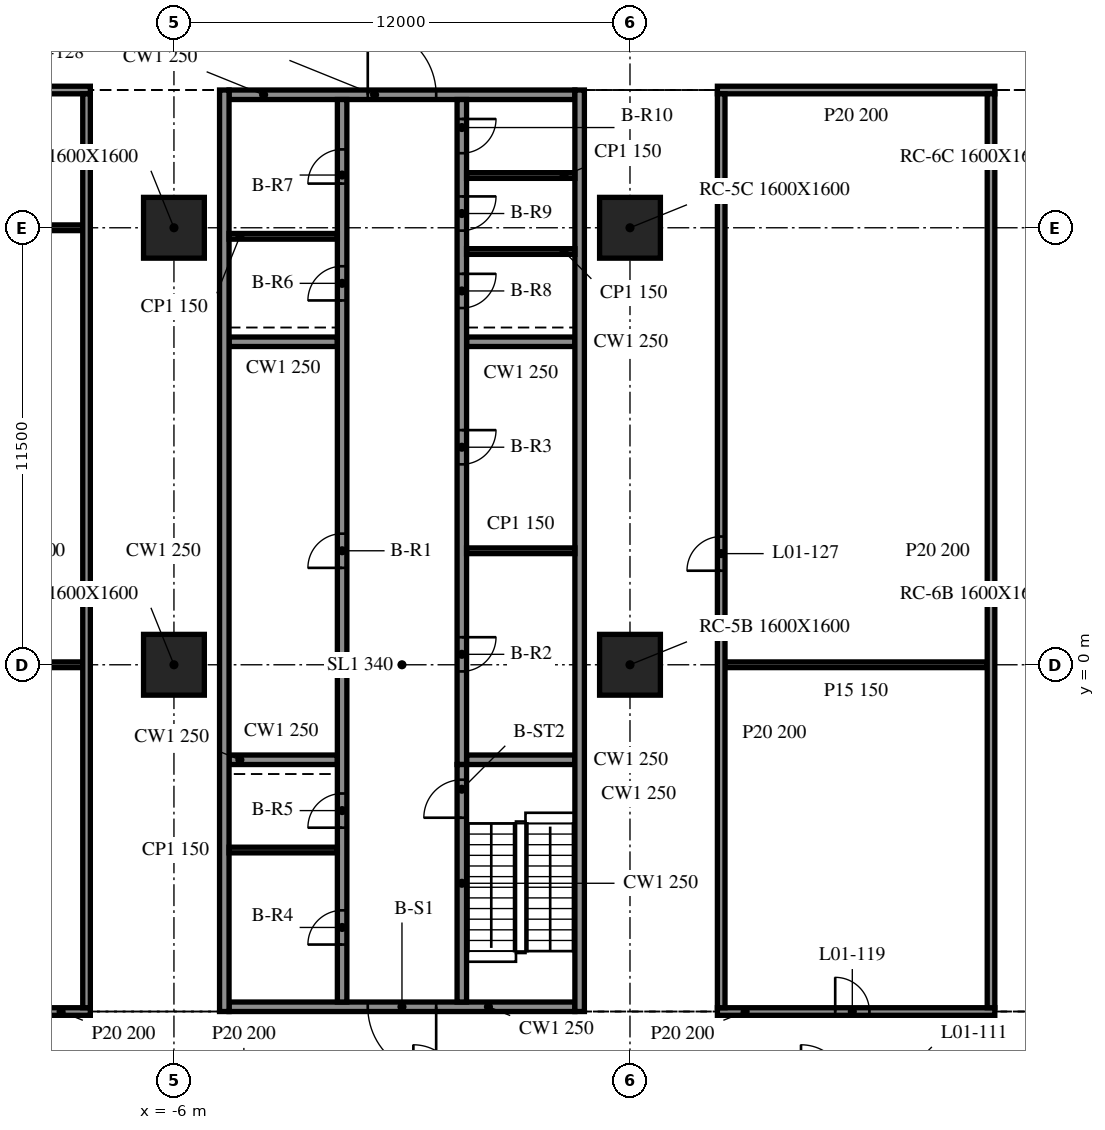
"""IFC4 building model, lengths in metres.
Left out: names, types, materials, properties, quantities, classifications, styles, units other than length and angle.
Written with IfcOpenShell. Run it as: python <this file> out.ifc"""

import sys

from ifc_helpers import new_model, si_unit, direction, frame, frame_2d, origin, origin_2d, place, context, subcontext, project, spatial, rectangle, extrude, element, fill, save


model = new_model("IFC4")
c1 = context("Model", 3, precision=1e-05, world=origin(), true_north=direction((0.0, 1.0)))
c2 = subcontext(c1, "Body", "Model", "MODEL_VIEW")
j1 = project(units=[si_unit("LENGTHUNIT", "METRE"), si_unit("PLANEANGLEUNIT", "RADIAN")], contexts=[c1])
p1 = place(None, origin())
s1 = spatial("IfcSite", under=j1, at=p1, CompositionType="ELEMENT")
p2 = place(p1, origin())
s2 = spatial("IfcBuilding", under=s1, at=p2, CompositionType="ELEMENT")
p3 = place(p2, frame((0.0, 0.0, 7.2)))
s3 = spatial("IfcBuildingStorey", under=s2, at=p3, CompositionType="ELEMENT", Elevation=7.2)
for number, where, z_axis, x_axis in (
    (1, (-6.0, 0.0, -0.34), (0.0, 0.0, 1.0), (1.0, 0.0, 0.0)),
    (2, (-6.0, 11.5, -0.34), (0.0, 0.0, 1.0), (1.0, 0.0, 0.0)),
    (3, (6.0, 0.0, -0.34), (0.0, 0.0, 1.0), (1.0, 0.0, 0.0)),
    (4, (6.0, 11.5, -0.34), (0.0, 0.0, 1.0), (1.0, 0.0, 0.0)),
):
    element("IfcColumn", number, at=place(p3, frame(where, z_axis=z_axis, x_axis=x_axis)), inside=s3, PredefinedType="COLUMN", context=c2, shape_type="SweptSolid", body=[
        extrude(rectangle(XDim=1.6, YDim=1.6, at=origin_2d()), origin(), (0.0, 0.0, 1.0), 4.3),
    ])
for number, where, z_axis, x_axis in (
    (5, (-4.675, 15.125, 0.0), (0.0, 0.0, 1.0), (0.0, -1.0, 0.0)),
    (6, (4.675, -9.125, 0.0), (0.0, 0.0, 1.0), (0.0, 1.0, 0.0)),
):
    element("IfcWall", number, at=place(p3, frame(where, z_axis=z_axis, x_axis=x_axis)), inside=s3, PredefinedType="SOLIDWALL", context=c2, shape_type="SweptSolid", body=[
        extrude(rectangle(XDim=24.25, YDim=0.25, at=frame_2d((12.125, 0.0))), origin(), (0.0, 0.0, 1.0), 3.96),
    ])
p4 = place(p3, frame((4.55, -9.0, 0.0), z_axis=(0.0, 0.0, 1.0), x_axis=(-1.0, 0.0, 0.0)))
e7 = element("IfcWall", 7, at=p4, inside=s3, PredefinedType="SOLIDWALL", context=c2, shape_type="SweptSolid", body=[
    extrude(rectangle(XDim=9.1, YDim=0.25, at=frame_2d((4.55, 0.0))), origin(), (0.0, 0.0, 1.0), 3.96),
])
p5 = place(p4, frame((3.65, 0.0, 0.0)))
e8 = element("IfcOpeningElement", 8, at=p5, cuts=e7, PredefinedType="OPENING", context=c2, shape_type="SweptSolid", body=[
    extrude(rectangle(XDim=1.8, YDim=2.1, at=frame_2d((0.9, 1.05))), frame((0.0, 0.135, 0.0), z_axis=(0.0, -1.0, 0.0), x_axis=(1.0, 0.0, 0.0)), (0.0, 0.0, 1.0), 0.27),
])
p6 = place(p3, frame((-4.55, 15.0, 0.0), z_axis=(0.0, 0.0, 1.0), x_axis=(1.0, 0.0, 0.0)))
e9 = element("IfcWall", 9, at=p6, inside=s3, PredefinedType="SOLIDWALL", context=c2, shape_type="SweptSolid", body=[
    extrude(rectangle(XDim=9.1, YDim=0.25, at=frame_2d((4.55, 0.0))), origin(), (0.0, 0.0, 1.0), 3.96),
])
p7 = place(p6, frame((3.65, 0.0, 0.0)))
e10 = element("IfcOpeningElement", 10, at=p7, cuts=e9, PredefinedType="OPENING", context=c2, shape_type="SweptSolid", body=[
    extrude(rectangle(XDim=1.8, YDim=2.1, at=frame_2d((0.9, 1.05))), frame((0.0, 0.135, 0.0), z_axis=(0.0, -1.0, 0.0), x_axis=(1.0, 0.0, 0.0)), (0.0, 0.0, 1.0), 0.27),
])
p8 = place(p3, frame((-1.575, -8.875, 0.0), z_axis=(0.0, 0.0, 1.0), x_axis=(0.0, 1.0, 0.0)))
e11 = element("IfcWall", 11, at=p8, inside=s3, PredefinedType="SOLIDWALL", context=c2, shape_type="SweptSolid", body=[
    extrude(rectangle(XDim=23.75, YDim=0.25, at=frame_2d((11.875, 0.0))), origin(), (0.0, 0.0, 1.0), 3.96),
])
p9 = place(p8, frame((11.425, 0.0, 0.0)))
e12 = element("IfcOpeningElement", 12, at=p9, cuts=e11, PredefinedType="OPENING", context=c2, shape_type="SweptSolid", body=[
    extrude(rectangle(XDim=0.9, YDim=2.1, at=frame_2d((0.45, 1.05))), frame((0.0, 0.135, 0.0), z_axis=(0.0, -1.0, 0.0), x_axis=(1.0, 0.0, 0.0)), (0.0, 0.0, 1.0), 0.27),
])
p10 = place(p8, frame((1.512, 0.0, 0.0)))
e13 = element("IfcOpeningElement", 13, at=p10, cuts=e11, PredefinedType="OPENING", context=c2, shape_type="SweptSolid", body=[
    extrude(rectangle(XDim=0.9, YDim=2.1, at=frame_2d((0.45, 1.05))), frame((0.0, 0.135, 0.0), z_axis=(0.0, -1.0, 0.0), x_axis=(1.0, 0.0, 0.0)), (0.0, 0.0, 1.0), 0.27),
])
p11 = place(p8, frame((4.587, 0.0, 0.0)))
e14 = element("IfcOpeningElement", 14, at=p11, cuts=e11, PredefinedType="OPENING", context=c2, shape_type="SweptSolid", body=[
    extrude(rectangle(XDim=0.9, YDim=2.1, at=frame_2d((0.45, 1.05))), frame((0.0, 0.135, 0.0), z_axis=(0.0, -1.0, 0.0), x_axis=(1.0, 0.0, 0.0)), (0.0, 0.0, 1.0), 0.27),
])
p12 = place(p8, frame((18.462, 0.0, 0.0)))
e15 = element("IfcOpeningElement", 15, at=p12, cuts=e11, PredefinedType="OPENING", context=c2, shape_type="SweptSolid", body=[
    extrude(rectangle(XDim=0.9, YDim=2.1, at=frame_2d((0.45, 1.05))), frame((0.0, 0.135, 0.0), z_axis=(0.0, -1.0, 0.0), x_axis=(1.0, 0.0, 0.0)), (0.0, 0.0, 1.0), 0.27),
])
p13 = place(p8, frame((21.538, 0.0, 0.0)))
e16 = element("IfcOpeningElement", 16, at=p13, cuts=e11, PredefinedType="OPENING", context=c2, shape_type="SweptSolid", body=[
    extrude(rectangle(XDim=0.9, YDim=2.1, at=frame_2d((0.45, 1.05))), frame((0.0, 0.135, 0.0), z_axis=(0.0, -1.0, 0.0), x_axis=(1.0, 0.0, 0.0)), (0.0, 0.0, 1.0), 0.27),
])
p14 = place(p3, frame((1.575, -8.875, 0.0), z_axis=(0.0, 0.0, 1.0), x_axis=(0.0, 1.0, 0.0)))
e17 = element("IfcWall", 17, at=p14, inside=s3, PredefinedType="SOLIDWALL", context=c2, shape_type="SweptSolid", body=[
    extrude(rectangle(XDim=6.25, YDim=0.25, at=frame_2d((3.125, 0.0))), origin(), (0.0, 0.0, 1.0), 3.96),
])
p15 = place(p14, frame((4.85, 0.0, 0.0)))
e18 = element("IfcOpeningElement", 18, at=p15, cuts=e17, PredefinedType="OPENING", context=c2, shape_type="SweptSolid", body=[
    extrude(rectangle(XDim=1.0, YDim=2.1, at=frame_2d((0.5, 1.05))), frame((0.0, 0.135, 0.0), z_axis=(0.0, -1.0, 0.0), x_axis=(1.0, 0.0, 0.0)), (0.0, 0.0, 1.0), 0.27),
])
p16 = place(p3, frame((1.575, 14.875, 0.0), z_axis=(0.0, 0.0, 1.0), x_axis=(0.0, -1.0, 0.0)))
e19 = element("IfcWall", 19, at=p16, inside=s3, PredefinedType="SOLIDWALL", context=c2, shape_type="SweptSolid", body=[
    extrude(rectangle(XDim=17.5, YDim=0.25, at=frame_2d((8.75, 0.0))), origin(), (0.0, 0.0, 1.0), 3.96),
])
p17 = place(p16, frame((14.15, 0.0, 0.0)))
e20 = element("IfcOpeningElement", 20, at=p17, cuts=e19, PredefinedType="OPENING", context=c2, shape_type="SweptSolid", body=[
    extrude(rectangle(XDim=0.9, YDim=2.1, at=frame_2d((0.45, 1.05))), frame((0.0, 0.135, 0.0), z_axis=(0.0, -1.0, 0.0), x_axis=(1.0, 0.0, 0.0)), (0.0, 0.0, 1.0), 0.27),
])
p18 = place(p16, frame((8.7, 0.0, 0.0)))
e21 = element("IfcOpeningElement", 21, at=p18, cuts=e19, PredefinedType="OPENING", context=c2, shape_type="SweptSolid", body=[
    extrude(rectangle(XDim=0.9, YDim=2.1, at=frame_2d((0.45, 1.05))), frame((0.0, 0.135, 0.0), z_axis=(0.0, -1.0, 0.0), x_axis=(1.0, 0.0, 0.0)), (0.0, 0.0, 1.0), 0.27),
])
p19 = place(p16, frame((4.587, 0.0, 0.0)))
e22 = element("IfcOpeningElement", 22, at=p19, cuts=e19, PredefinedType="OPENING", context=c2, shape_type="SweptSolid", body=[
    extrude(rectangle(XDim=0.9, YDim=2.1, at=frame_2d((0.45, 1.05))), frame((0.0, 0.135, 0.0), z_axis=(0.0, -1.0, 0.0), x_axis=(1.0, 0.0, 0.0)), (0.0, 0.0, 1.0), 0.27),
])
p20 = place(p16, frame((2.55, 0.0, 0.0)))
e23 = element("IfcOpeningElement", 23, at=p20, cuts=e19, PredefinedType="OPENING", context=c2, shape_type="SweptSolid", body=[
    extrude(rectangle(XDim=0.9, YDim=2.1, at=frame_2d((0.45, 1.05))), frame((0.0, 0.135, 0.0), z_axis=(0.0, -1.0, 0.0), x_axis=(1.0, 0.0, 0.0)), (0.0, 0.0, 1.0), 0.27),
])
p21 = place(p16, frame((0.512, 0.0, 0.0)))
e24 = element("IfcOpeningElement", 24, at=p21, cuts=e19, PredefinedType="OPENING", context=c2, shape_type="SweptSolid", body=[
    extrude(rectangle(XDim=0.9, YDim=2.1, at=frame_2d((0.45, 1.05))), frame((0.0, 0.135, 0.0), z_axis=(0.0, -1.0, 0.0), x_axis=(1.0, 0.0, 0.0)), (0.0, 0.0, 1.0), 0.27),
])
for number, where, z_axis, x_axis in (
    (25, (-4.55, -2.5, 0.0), (0.0, 0.0, 1.0), (1.0, 0.0, 0.0)),
    (26, (-4.55, 8.5, 0.0), (0.0, 0.0, 1.0), (1.0, 0.0, 0.0)),
    (27, (1.7, -2.5, 0.0), (0.0, 0.0, 1.0), (1.0, 0.0, 0.0)),
    (28, (1.7, 8.5, 0.0), (0.0, 0.0, 1.0), (1.0, 0.0, 0.0)),
):
    element("IfcWall", number, at=place(p3, frame(where, z_axis=z_axis, x_axis=x_axis)), inside=s3, PredefinedType="SOLIDWALL", context=c2, shape_type="SweptSolid", body=[
        extrude(rectangle(XDim=2.85, YDim=0.25, at=frame_2d((1.425, 0.0))), origin(), (0.0, 0.0, 1.0), 3.96),
    ])
for number, where, z_axis, x_axis in (
    (29, (1.7, 3.0, 0.0), (0.0, 0.0, 1.0), (1.0, 0.0, 0.0)),
    (30, (-4.55, -4.875, 0.0), (0.0, 0.0, 1.0), (1.0, 0.0, 0.0)),
    (31, (-4.55, 11.275, 0.0), (0.0, 0.0, 1.0), (1.0, 0.0, 0.0)),
    (32, (1.7, 10.875, 0.0), (0.0, 0.0, 1.0), (1.0, 0.0, 0.0)),
    (33, (1.7, 12.875, 0.0), (0.0, 0.0, 1.0), (1.0, 0.0, 0.0)),
):
    element("IfcWall", number, at=place(p3, frame(where, z_axis=z_axis, x_axis=x_axis)), inside=s3, PredefinedType="PARTITIONING", context=c2, shape_type="SweptSolid", body=[
        extrude(rectangle(XDim=2.85, YDim=0.15, at=frame_2d((1.425, 0.0))), origin(), (0.0, 0.0, 1.0), 3.96),
    ])
p22 = place(p3, frame((-15.9, -9.125, 0.0), z_axis=(0.0, 0.0, 1.0), x_axis=(1.0, 0.0, 0.0)))
e34 = element("IfcWall", 34, at=p22, inside=s3, PredefinedType="PARTITIONING", context=c2, shape_type="SweptSolid", body=[
    extrude(rectangle(XDim=7.7, YDim=0.2, at=frame_2d((3.85, 0.0))), origin(), (0.0, 0.0, 1.0), 3.96),
])
p23 = place(p22, frame((3.3, 0.0, 0.0)))
e35 = element("IfcOpeningElement", 35, at=p23, cuts=e34, PredefinedType="OPENING", context=c2, shape_type="SweptSolid", body=[
    extrude(rectangle(XDim=0.9, YDim=2.1, at=frame_2d((0.45, 1.05))), frame((0.0, 0.11, 0.0), z_axis=(0.0, -1.0, 0.0), x_axis=(1.0, 0.0, 0.0)), (0.0, 0.0, 1.0), 0.22),
])
p24 = place(p3, frame((8.3, -9.125, 0.0), z_axis=(0.0, 0.0, 1.0), x_axis=(1.0, 0.0, 0.0)))
e36 = element("IfcWall", 36, at=p24, inside=s3, PredefinedType="PARTITIONING", context=c2, shape_type="SweptSolid", body=[
    extrude(rectangle(XDim=7.3, YDim=0.2, at=frame_2d((3.65, 0.0))), origin(), (0.0, 0.0, 1.0), 3.96),
])
p25 = place(p24, frame((3.1, 0.0, 0.0)))
e37 = element("IfcOpeningElement", 37, at=p25, cuts=e36, PredefinedType="OPENING", context=c2, shape_type="SweptSolid", body=[
    extrude(rectangle(XDim=0.9, YDim=2.1, at=frame_2d((0.45, 1.05))), frame((0.0, 0.11, 0.0), z_axis=(0.0, -1.0, 0.0), x_axis=(1.0, 0.0, 0.0)), (0.0, 0.0, 1.0), 0.22),
])
p26 = place(p3, frame((-15.7, 0.0, 0.0), z_axis=(0.0, 0.0, 1.0), x_axis=(1.0, 0.0, 0.0)))
e38 = element("IfcWall", 38, at=p26, inside=s3, PredefinedType="PARTITIONING", context=c2, shape_type="SweptSolid", body=[
    extrude(rectangle(XDim=7.3, YDim=0.15, at=frame_2d((3.65, 0.0))), origin(), (0.0, 0.0, 1.0), 3.96),
])
p27 = place(p3, frame((8.5, 0.0, 0.0), z_axis=(0.0, 0.0, 1.0), x_axis=(1.0, 0.0, 0.0)))
e39 = element("IfcWall", 39, at=p27, inside=s3, PredefinedType="PARTITIONING", context=c2, shape_type="SweptSolid", body=[
    extrude(rectangle(XDim=6.9, YDim=0.15, at=frame_2d((3.45, 0.0))), origin(), (0.0, 0.0, 1.0), 3.96),
])
p28 = place(p3, frame((-15.7, 11.5, 0.0), z_axis=(0.0, 0.0, 1.0), x_axis=(1.0, 0.0, 0.0)))
e40 = element("IfcWall", 40, at=p28, inside=s3, PredefinedType="PARTITIONING", context=c2, shape_type="SweptSolid", body=[
    extrude(rectangle(XDim=7.3, YDim=0.15, at=frame_2d((3.65, 0.0))), origin(), (0.0, 0.0, 1.0), 3.96),
])
p29 = place(p3, frame((-15.9, 15.125, 0.0), z_axis=(0.0, 0.0, 1.0), x_axis=(1.0, 0.0, 0.0)))
e41 = element("IfcWall", 41, at=p29, inside=s3, PredefinedType="PARTITIONING", context=c2, shape_type="SweptSolid", body=[
    extrude(rectangle(XDim=7.7, YDim=0.2, at=frame_2d((3.85, 0.0))), origin(), (0.0, 0.0, 1.0), 3.96),
])
p30 = place(p29, frame((3.3, 0.0, 0.0)))
e42 = element("IfcOpeningElement", 42, at=p30, cuts=e41, PredefinedType="OPENING", context=c2, shape_type="SweptSolid", body=[
    extrude(rectangle(XDim=1.0, YDim=2.1, at=frame_2d((0.5, 1.05))), frame((0.0, 0.11, 0.0), z_axis=(0.0, -1.0, 0.0), x_axis=(1.0, 0.0, 0.0)), (0.0, 0.0, 1.0), 0.22),
])
p31 = place(p3, frame((8.3, 15.125, 0.0), z_axis=(0.0, 0.0, 1.0), x_axis=(1.0, 0.0, 0.0)))
e43 = element("IfcWall", 43, at=p31, inside=s3, PredefinedType="PARTITIONING", context=c2, shape_type="SweptSolid", body=[
    extrude(rectangle(XDim=7.3, YDim=0.2, at=frame_2d((3.65, 0.0))), origin(), (0.0, 0.0, 1.0), 3.96),
])
p32 = place(p3, frame((-8.3, -9.025, 0.0), z_axis=(0.0, 0.0, 1.0), x_axis=(0.0, 1.0, 0.0)))
e44 = element("IfcWall", 44, at=p32, inside=s3, PredefinedType="PARTITIONING", context=c2, shape_type="SweptSolid", body=[
    extrude(rectangle(XDim=24.05, YDim=0.2, at=frame_2d((12.025, 0.0))), origin(), (0.0, 0.0, 1.0), 3.96),
])
p33 = place(p3, frame((8.4, -9.025, 0.0), z_axis=(0.0, 0.0, 1.0), x_axis=(0.0, 1.0, 0.0)))
e45 = element("IfcWall", 45, at=p33, inside=s3, PredefinedType="PARTITIONING", context=c2, shape_type="SweptSolid", body=[
    extrude(rectangle(XDim=24.05, YDim=0.2, at=frame_2d((12.025, 0.0))), origin(), (0.0, 0.0, 1.0), 3.96),
])
p34 = place(p33, frame((11.5, 0.0, 0.0)))
e46 = element("IfcOpeningElement", 46, at=p34, cuts=e45, PredefinedType="OPENING", context=c2, shape_type="SweptSolid", body=[
    extrude(rectangle(XDim=0.9, YDim=2.1, at=frame_2d((0.45, 1.05))), frame((0.0, 0.11, 0.0), z_axis=(0.0, -1.0, 0.0), x_axis=(1.0, 0.0, 0.0)), (0.0, 0.0, 1.0), 0.22),
])
p35 = place(p3, frame((15.5, -9.025, 0.0), z_axis=(0.0, 0.0, 1.0), x_axis=(0.0, 1.0, 0.0)))
e47 = element("IfcWall", 47, at=p35, inside=s3, PredefinedType="PARTITIONING", context=c2, shape_type="SweptSolid", body=[
    extrude(rectangle(XDim=24.05, YDim=0.2, at=frame_2d((12.025, 0.0))), origin(), (0.0, 0.0, 1.0), 3.96),
])
p36 = place(p5, origin())
e48 = element("IfcDoor", 48, at=p36, inside=s3, OperationType="DOUBLE_DOOR_SINGLE_SWING", PredefinedType="DOOR", context=c2, shape_type="SweptSolid", body=[
    extrude(rectangle(XDim=1.8, YDim=2.1, at=frame_2d((0.9, 1.05))), frame((0.0, 0.025, 0.0), z_axis=(0.0, -1.0, 0.0), x_axis=(1.0, 0.0, 0.0)), (0.0, 0.0, 1.0), 0.05),
])
fill(e8, e48)
p37 = place(p7, origin())
e49 = element("IfcDoor", 49, at=p37, inside=s3, OperationType="DOUBLE_DOOR_SINGLE_SWING", PredefinedType="DOOR", context=c2, shape_type="SweptSolid", body=[
    extrude(rectangle(XDim=1.8, YDim=2.1, at=frame_2d((0.9, 1.05))), frame((0.0, 0.025, 0.0), z_axis=(0.0, -1.0, 0.0), x_axis=(1.0, 0.0, 0.0)), (0.0, 0.0, 1.0), 0.05),
])
fill(e10, e49)
p38 = place(p9, origin())
e50 = element("IfcDoor", 50, at=p38, inside=s3, OperationType="SINGLE_SWING_LEFT", PredefinedType="DOOR", context=c2, shape_type="SweptSolid", body=[
    extrude(rectangle(XDim=0.9, YDim=2.1, at=frame_2d((0.45, 1.05))), frame((0.0, 0.025, 0.0), z_axis=(0.0, -1.0, 0.0), x_axis=(1.0, 0.0, 0.0)), (0.0, 0.0, 1.0), 0.05),
])
fill(e12, e50)
p39 = place(p17, origin())
e51 = element("IfcDoor", 51, at=p39, inside=s3, OperationType="SINGLE_SWING_RIGHT", PredefinedType="DOOR", context=c2, shape_type="SweptSolid", body=[
    extrude(rectangle(XDim=0.9, YDim=2.1, at=frame_2d((0.45, 1.05))), frame((0.0, 0.025, 0.0), z_axis=(0.0, -1.0, 0.0), x_axis=(1.0, 0.0, 0.0)), (0.0, 0.0, 1.0), 0.05),
])
fill(e20, e51)
p40 = place(p18, origin())
e52 = element("IfcDoor", 52, at=p40, inside=s3, OperationType="SINGLE_SWING_LEFT", PredefinedType="DOOR", context=c2, shape_type="SweptSolid", body=[
    extrude(rectangle(XDim=0.9, YDim=2.1, at=frame_2d((0.45, 1.05))), frame((0.0, 0.025, 0.0), z_axis=(0.0, -1.0, 0.0), x_axis=(1.0, 0.0, 0.0)), (0.0, 0.0, 1.0), 0.05),
])
fill(e21, e52)
p41 = place(p10, origin())
e53 = element("IfcDoor", 53, at=p41, inside=s3, OperationType="SINGLE_SWING_RIGHT", PredefinedType="DOOR", context=c2, shape_type="SweptSolid", body=[
    extrude(rectangle(XDim=0.9, YDim=2.1, at=frame_2d((0.45, 1.05))), frame((0.0, 0.025, 0.0), z_axis=(0.0, -1.0, 0.0), x_axis=(1.0, 0.0, 0.0)), (0.0, 0.0, 1.0), 0.05),
])
fill(e13, e53)
p42 = place(p11, origin())
e54 = element("IfcDoor", 54, at=p42, inside=s3, OperationType="SINGLE_SWING_LEFT", PredefinedType="DOOR", context=c2, shape_type="SweptSolid", body=[
    extrude(rectangle(XDim=0.9, YDim=2.1, at=frame_2d((0.45, 1.05))), frame((0.0, 0.025, 0.0), z_axis=(0.0, -1.0, 0.0), x_axis=(1.0, 0.0, 0.0)), (0.0, 0.0, 1.0), 0.05),
])
fill(e14, e54)
p43 = place(p12, origin())
e55 = element("IfcDoor", 55, at=p43, inside=s3, OperationType="SINGLE_SWING_RIGHT", PredefinedType="DOOR", context=c2, shape_type="SweptSolid", body=[
    extrude(rectangle(XDim=0.9, YDim=2.1, at=frame_2d((0.45, 1.05))), frame((0.0, 0.025, 0.0), z_axis=(0.0, -1.0, 0.0), x_axis=(1.0, 0.0, 0.0)), (0.0, 0.0, 1.0), 0.05),
])
fill(e15, e55)
p44 = place(p13, origin())
e56 = element("IfcDoor", 56, at=p44, inside=s3, OperationType="SINGLE_SWING_LEFT", PredefinedType="DOOR", context=c2, shape_type="SweptSolid", body=[
    extrude(rectangle(XDim=0.9, YDim=2.1, at=frame_2d((0.45, 1.05))), frame((0.0, 0.025, 0.0), z_axis=(0.0, -1.0, 0.0), x_axis=(1.0, 0.0, 0.0)), (0.0, 0.0, 1.0), 0.05),
])
fill(e16, e56)
p45 = place(p19, origin())
e57 = element("IfcDoor", 57, at=p45, inside=s3, OperationType="SINGLE_SWING_RIGHT", PredefinedType="DOOR", context=c2, shape_type="SweptSolid", body=[
    extrude(rectangle(XDim=0.9, YDim=2.1, at=frame_2d((0.45, 1.05))), frame((0.0, 0.025, 0.0), z_axis=(0.0, -1.0, 0.0), x_axis=(1.0, 0.0, 0.0)), (0.0, 0.0, 1.0), 0.05),
])
fill(e22, e57)
p46 = place(p20, origin())
e58 = element("IfcDoor", 58, at=p46, inside=s3, OperationType="SINGLE_SWING_LEFT", PredefinedType="DOOR", context=c2, shape_type="SweptSolid", body=[
    extrude(rectangle(XDim=0.9, YDim=2.1, at=frame_2d((0.45, 1.05))), frame((0.0, 0.025, 0.0), z_axis=(0.0, -1.0, 0.0), x_axis=(1.0, 0.0, 0.0)), (0.0, 0.0, 1.0), 0.05),
])
fill(e23, e58)
p47 = place(p21, origin())
e59 = element("IfcDoor", 59, at=p47, inside=s3, OperationType="SINGLE_SWING_RIGHT", PredefinedType="DOOR", context=c2, shape_type="SweptSolid", body=[
    extrude(rectangle(XDim=0.9, YDim=2.1, at=frame_2d((0.45, 1.05))), frame((0.0, 0.025, 0.0), z_axis=(0.0, -1.0, 0.0), x_axis=(1.0, 0.0, 0.0)), (0.0, 0.0, 1.0), 0.05),
])
fill(e24, e59)
p48 = place(p15, origin())
e60 = element("IfcDoor", 60, at=p48, inside=s3, OperationType="SINGLE_SWING_LEFT", PredefinedType="DOOR", context=c2, shape_type="SweptSolid", body=[
    extrude(rectangle(XDim=1.0, YDim=2.1, at=frame_2d((0.5, 1.05))), frame((0.0, 0.025, 0.0), z_axis=(0.0, -1.0, 0.0), x_axis=(1.0, 0.0, 0.0)), (0.0, 0.0, 1.0), 0.05),
])
fill(e18, e60)
p49 = place(p25, origin())
e61 = element("IfcDoor", 61, at=p49, inside=s3, OperationType="SINGLE_SWING_LEFT", PredefinedType="DOOR", context=c2, shape_type="SweptSolid", body=[
    extrude(rectangle(XDim=0.9, YDim=2.1, at=frame_2d((0.45, 1.05))), frame((0.0, 0.025, 0.0), z_axis=(0.0, -1.0, 0.0), x_axis=(1.0, 0.0, 0.0)), (0.0, 0.0, 1.0), 0.05),
])
fill(e37, e61)
p50 = place(p34, origin())
e62 = element("IfcDoor", 62, at=p50, inside=s3, OperationType="SINGLE_SWING_RIGHT", PredefinedType="DOOR", context=c2, shape_type="SweptSolid", body=[
    extrude(rectangle(XDim=0.9, YDim=2.1, at=frame_2d((0.45, 1.05))), frame((0.0, 0.025, 0.0), z_axis=(0.0, -1.0, 0.0), x_axis=(1.0, 0.0, 0.0)), (0.0, 0.0, 1.0), 0.05),
])
fill(e46, e62)
save(model, sys.argv[1])
